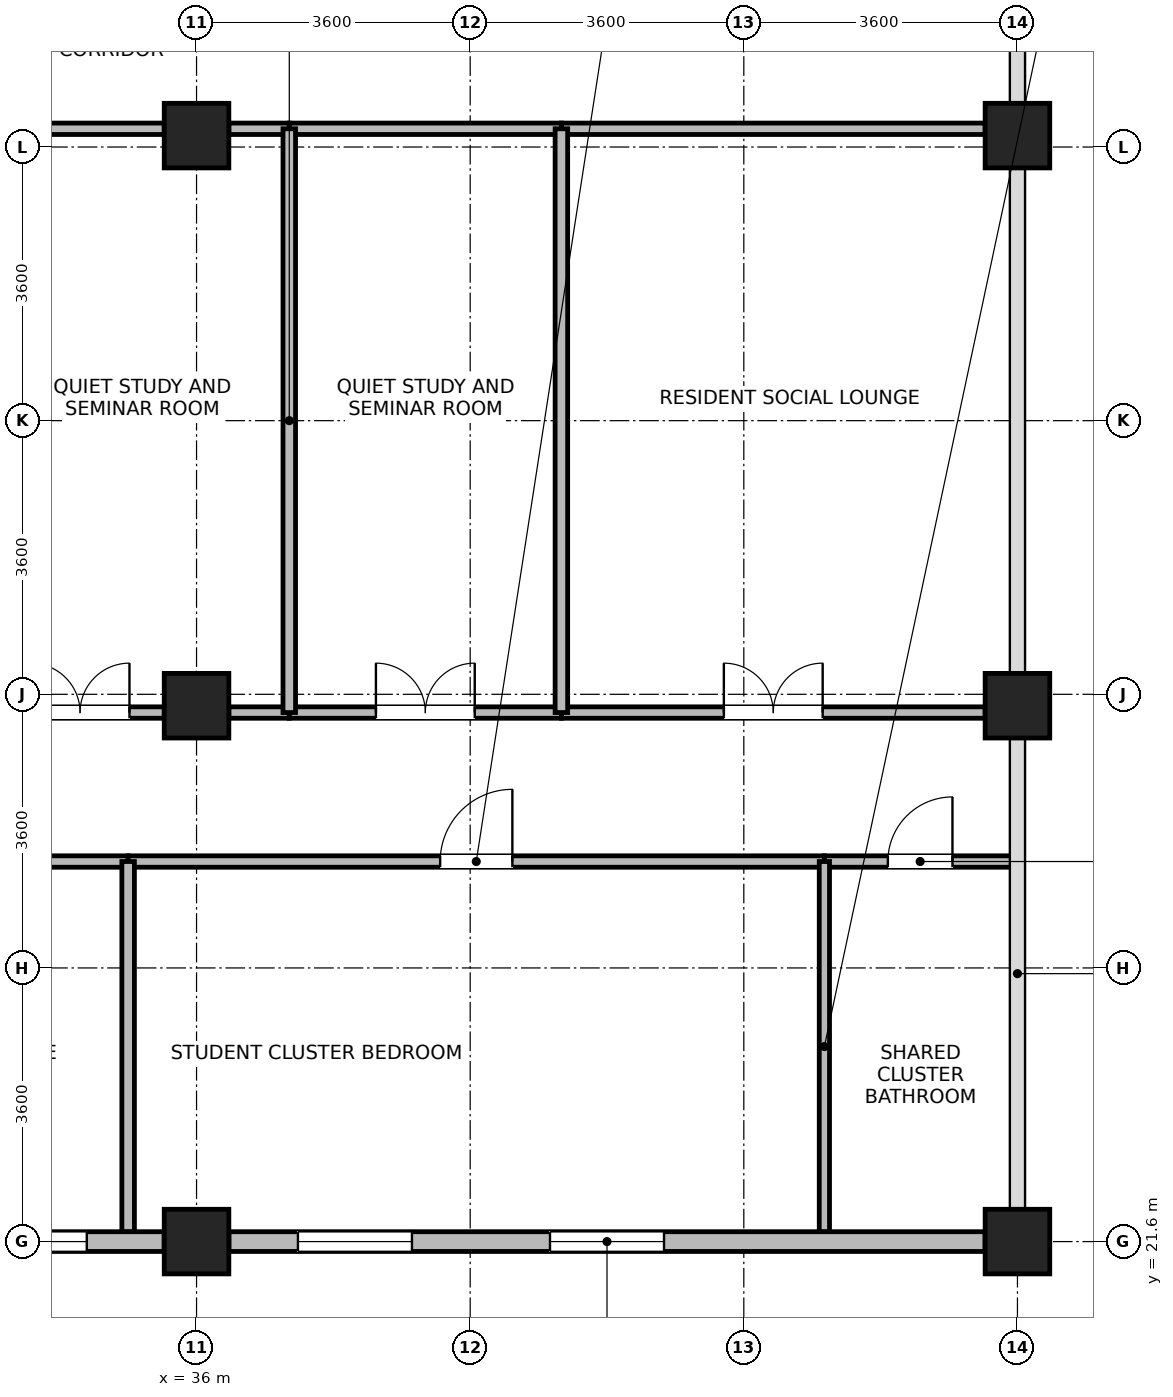
"""IFC4 building model, lengths in metres.
Left out: names, types, materials, properties, quantities, classifications, styles, units other than length and angle.
Written with IfcOpenShell. Run it as: python <this file> out.ifc"""

import sys

from ifc_helpers import new_model, si_unit, direction, frame, frame_2d, origin, origin_2d, place, context, subcontext, project, spatial, rectangle, extrude, source, transform, mapped, element, fill, save


model = new_model("IFC4")
c1 = context("Model", 3, precision=1e-05, world=origin(), true_north=direction((0.0, 1.0)))
c2 = subcontext(c1, "Body", "Model", "MODEL_VIEW")
j1 = project(units=[si_unit("LENGTHUNIT", "METRE"), si_unit("PLANEANGLEUNIT", "RADIAN")], contexts=[c1])
p1 = place(None, origin())
s1 = spatial("IfcSite", under=j1, at=p1, CompositionType="ELEMENT")
p2 = place(p1, origin())
s2 = spatial("IfcBuilding", under=s1, at=p2, CompositionType="ELEMENT")
p3 = place(p2, frame((0.0, 0.0, 283.2)))
s3 = spatial("IfcBuildingStorey", under=s2, at=p3, CompositionType="ELEMENT", Elevation=283.2)
m1 = source(origin(), c2, "Body", "SweptSolid", [
    extrude(rectangle(XDim=0.85, YDim=0.85, at=origin_2d()), origin(), (0.0, 0.0, 1.0), 3.7),
])
for number, where, z_axis, x_axis in (
    (1, (36.0, 21.6, 0.0), (0.0, 0.0, 1.0), (1.0, 0.0, 0.0)),
    (2, (36.0, 28.65, 0.0), (0.0, 0.0, 1.0), (1.0, 0.0, 0.0)),
    (3, (36.0, 36.15, 0.0), (0.0, 0.0, 1.0), (1.0, 0.0, 0.0)),
    (4, (46.8, 21.6, 0.0), (0.0, 0.0, 1.0), (1.0, 0.0, 0.0)),
    (5, (46.8, 28.65, 0.0), (0.0, 0.0, 1.0), (1.0, 0.0, 0.0)),
    (6, (46.8, 36.15, 0.0), (0.0, 0.0, 1.0), (1.0, 0.0, 0.0)),
):
    element("IfcColumn", number, at=place(p3, frame(where, z_axis=z_axis, x_axis=x_axis)), inside=s3, PredefinedType="COLUMN", context=c2, shape_type="MappedRepresentation", body=[
        mapped(m1, transform((0.0, 0.0, 0.0), x_axis=(1.0, 0.0, 0.0), y_axis=(0.0, 1.0, 0.0), z_axis=(0.0, 0.0, 1.0), scale=1.0)),
    ])
p4 = place(p3, frame((35.574, 21.6, 0.0), z_axis=(0.0, 0.0, 1.0), x_axis=(-1.0, 0.0, 0.0)))
e7 = element("IfcWall", 7, at=p4, inside=s3, PredefinedType="STANDARD", context=c2, shape_type="SweptSolid", body=[
    extrude(rectangle(XDim=2.986, YDim=0.26, at=frame_2d((1.493, 0.0))), origin(), (0.0, 0.0, 1.0), 3.055),
])
p5 = place(p4, frame((1.018, 0.0, 0.85)))
e8 = element("IfcOpeningElement", 8, at=p5, cuts=e7, PredefinedType="OPENING", context=c2, shape_type="SweptSolid", body=[
    extrude(rectangle(XDim=0.95, YDim=1.75, at=frame_2d((0.475, 0.875))), frame((0.0, 0.14, 0.0), z_axis=(0.0, -1.0, 0.0), x_axis=(1.0, 0.0, 0.0)), (0.0, 0.0, 1.0), 0.28),
])
p6 = place(p3, frame((46.374, 21.6, 0.0), z_axis=(0.0, 0.0, 1.0), x_axis=(-1.0, 0.0, 0.0)))
e9 = element("IfcWall", 9, at=p6, inside=s3, PredefinedType="STANDARD", context=c2, shape_type="SweptSolid", body=[
    extrude(rectangle(XDim=9.948, YDim=0.26, at=frame_2d((4.974, 0.0))), origin(), (0.0, 0.0, 1.0), 3.055),
])
p7 = place(p6, frame((4.224, 0.0, 0.85)))
e10 = element("IfcOpeningElement", 10, at=p7, cuts=e9, PredefinedType="OPENING", context=c2, shape_type="SweptSolid", body=[
    extrude(rectangle(XDim=1.5, YDim=1.85, at=frame_2d((0.75, 0.925))), frame((0.0, 0.14, 0.0), z_axis=(0.0, -1.0, 0.0), x_axis=(1.0, 0.0, 0.0)), (0.0, 0.0, 1.0), 0.28),
])
p8 = place(p6, frame((7.54, 0.0, 0.85)))
e11 = element("IfcOpeningElement", 11, at=p8, cuts=e9, PredefinedType="OPENING", context=c2, shape_type="SweptSolid", body=[
    extrude(rectangle(XDim=1.5, YDim=1.85, at=frame_2d((0.75, 0.925))), frame((0.0, 0.14, 0.0), z_axis=(0.0, -1.0, 0.0), x_axis=(1.0, 0.0, 0.0)), (0.0, 0.0, 1.0), 0.28),
])
p9 = place(p3, frame((16.2, 26.6, 0.0), z_axis=(0.0, 0.0, 1.0), x_axis=(1.0, 0.0, 0.0)))
e12 = element("IfcWall", 12, at=p9, inside=s3, PredefinedType="PARTITIONING", context=c2, shape_type="SweptSolid", body=[
    extrude(rectangle(XDim=18.9, YDim=0.15, at=frame_2d((9.45, 0.0))), origin(), (0.0, 0.0, 1.0), 3.455),
])
p10 = place(p9, frame((8.8, 0.0, 0.0)))
e13 = element("IfcOpeningElement", 13, at=p10, cuts=e12, PredefinedType="OPENING", context=c2, shape_type="SweptSolid", body=[
    extrude(rectangle(XDim=1.3, YDim=2.12, at=frame_2d((0.65, 1.06))), frame((0.0, 0.085, 0.0), z_axis=(0.0, -1.0, 0.0), x_axis=(1.0, 0.0, 0.0)), (0.0, 0.0, 1.0), 0.17),
])
p11 = place(p3, frame((35.1, 26.6, 0.0), z_axis=(0.0, 0.0, 1.0), x_axis=(1.0, 0.0, 0.0)))
e14 = element("IfcWall", 14, at=p11, inside=s3, PredefinedType="PARTITIONING", context=c2, shape_type="SweptSolid", body=[
    extrude(rectangle(XDim=9.16, YDim=0.15, at=frame_2d((4.58, 0.0))), origin(), (0.0, 0.0, 1.0), 3.455),
])
p12 = place(p11, frame((4.105, 0.0, 0.0)))
e15 = element("IfcOpeningElement", 15, at=p12, cuts=e14, PredefinedType="OPENING", context=c2, shape_type="SweptSolid", body=[
    extrude(rectangle(XDim=0.95, YDim=2.1, at=frame_2d((0.475, 1.05))), frame((0.0, 0.085, 0.0), z_axis=(0.0, -1.0, 0.0), x_axis=(1.0, 0.0, 0.0)), (0.0, 0.0, 1.0), 0.17),
])
p13 = place(p3, frame((40.8, 28.56, 0.0), z_axis=(0.0, 0.0, 1.0), x_axis=(1.0, 0.0, 0.0)))
e16 = element("IfcWall", 16, at=p13, inside=s3, PredefinedType="PARTITIONING", context=c2, shape_type="SweptSolid", body=[
    extrude(rectangle(XDim=5.575, YDim=0.15, at=frame_2d((2.788, 0.0))), origin(), (0.0, 0.0, 1.0), 2.905),
])
p14 = place(p13, frame((2.137, 0.0, 0.0)))
e17 = element("IfcOpeningElement", 17, at=p14, cuts=e16, PredefinedType="OPENING", context=c2, shape_type="SweptSolid", body=[
    extrude(rectangle(XDim=1.3, YDim=2.12, at=frame_2d((0.65, 1.06))), frame((0.0, 0.085, 0.0), z_axis=(0.0, -1.0, 0.0), x_axis=(1.0, 0.0, 0.0)), (0.0, 0.0, 1.0), 0.17),
])
p15 = place(p3, frame((40.8, 36.24, 0.0), z_axis=(0.0, 0.0, 1.0), x_axis=(1.0, 0.0, 0.0)))
e18 = element("IfcWall", 18, at=p15, inside=s3, PredefinedType="PARTITIONING", context=c2, shape_type="SweptSolid", body=[
    extrude(rectangle(XDim=5.575, YDim=0.15, at=frame_2d((2.788, 0.0))), origin(), (0.0, 0.0, 1.0), 2.905),
])
p16 = place(p3, frame((33.36, 28.56, 0.0), z_axis=(0.0, 0.0, 1.0), x_axis=(1.0, 0.0, 0.0)))
e19 = element("IfcWall", 19, at=p16, inside=s3, PredefinedType="PARTITIONING", context=c2, shape_type="SweptSolid", body=[
    extrude(rectangle(XDim=2.215, YDim=0.15, at=frame_2d((1.107, 0.0))), origin(), (0.0, 0.0, 1.0), 2.905),
])
p17 = place(p16, frame((0.458, 0.0, 0.0)))
e20 = element("IfcOpeningElement", 20, at=p17, cuts=e19, PredefinedType="OPENING", context=c2, shape_type="SweptSolid", body=[
    extrude(rectangle(XDim=1.3, YDim=2.12, at=frame_2d((0.65, 1.06))), frame((0.0, 0.085, 0.0), z_axis=(0.0, -1.0, 0.0), x_axis=(1.0, 0.0, 0.0)), (0.0, 0.0, 1.0), 0.17),
])
p18 = place(p3, frame((36.425, 28.56, 0.0), z_axis=(0.0, 0.0, 1.0), x_axis=(1.0, 0.0, 0.0)))
e21 = element("IfcWall", 21, at=p18, inside=s3, PredefinedType="PARTITIONING", context=c2, shape_type="SweptSolid", body=[
    extrude(rectangle(XDim=0.795, YDim=0.15, at=frame_2d((0.397, 0.0))), origin(), (0.0, 0.0, 1.0), 2.905),
])
p19 = place(p3, frame((33.36, 36.24, 0.0), z_axis=(0.0, 0.0, 1.0), x_axis=(1.0, 0.0, 0.0)))
e22 = element("IfcWall", 22, at=p19, inside=s3, PredefinedType="PARTITIONING", context=c2, shape_type="SweptSolid", body=[
    extrude(rectangle(XDim=2.215, YDim=0.15, at=frame_2d((1.107, 0.0))), origin(), (0.0, 0.0, 1.0), 2.905),
])
p20 = place(p3, frame((36.425, 36.24, 0.0), z_axis=(0.0, 0.0, 1.0), x_axis=(1.0, 0.0, 0.0)))
e23 = element("IfcWall", 23, at=p20, inside=s3, PredefinedType="PARTITIONING", context=c2, shape_type="SweptSolid", body=[
    extrude(rectangle(XDim=0.795, YDim=0.15, at=frame_2d((0.397, 0.0))), origin(), (0.0, 0.0, 1.0), 2.905),
])
p21 = place(p3, frame((37.22, 28.56, 0.0), z_axis=(0.0, 0.0, 1.0), x_axis=(1.0, 0.0, 0.0)))
e24 = element("IfcWall", 24, at=p21, inside=s3, PredefinedType="PARTITIONING", context=c2, shape_type="SweptSolid", body=[
    extrude(rectangle(XDim=3.58, YDim=0.15, at=frame_2d((1.79, 0.0))), origin(), (0.0, 0.0, 1.0), 2.905),
])
p22 = place(p21, frame((1.14, 0.0, 0.0)))
e25 = element("IfcOpeningElement", 25, at=p22, cuts=e24, PredefinedType="OPENING", context=c2, shape_type="SweptSolid", body=[
    extrude(rectangle(XDim=1.3, YDim=2.12, at=frame_2d((0.65, 1.06))), frame((0.0, 0.085, 0.0), z_axis=(0.0, -1.0, 0.0), x_axis=(1.0, 0.0, 0.0)), (0.0, 0.0, 1.0), 0.17),
])
p23 = place(p3, frame((37.22, 36.24, 0.0), z_axis=(0.0, 0.0, 1.0), x_axis=(1.0, 0.0, 0.0)))
e26 = element("IfcWall", 26, at=p23, inside=s3, PredefinedType="PARTITIONING", context=c2, shape_type="SweptSolid", body=[
    extrude(rectangle(XDim=3.58, YDim=0.15, at=frame_2d((1.79, 0.0))), origin(), (0.0, 0.0, 1.0), 2.905),
])
p24 = place(p3, frame((44.26, 26.6, 0.0), z_axis=(0.0, 0.0, 1.0), x_axis=(1.0, 0.0, 0.0)))
e27 = element("IfcWall", 27, at=p24, inside=s3, PredefinedType="PARTITIONING", context=c2, shape_type="SweptSolid", body=[
    extrude(rectangle(XDim=2.52, YDim=0.15, at=frame_2d((1.26, 0.0))), origin(), (0.0, 0.0, 1.0), 3.455),
])
p25 = place(p24, frame((0.835, 0.0, 0.0)))
e28 = element("IfcOpeningElement", 28, at=p25, cuts=e27, PredefinedType="OPENING", context=c2, shape_type="SweptSolid", body=[
    extrude(rectangle(XDim=0.85, YDim=2.04, at=frame_2d((0.425, 1.02))), frame((0.0, 0.085, 0.0), z_axis=(0.0, -1.0, 0.0), x_axis=(1.0, 0.0, 0.0)), (0.0, 0.0, 1.0), 0.17),
])
for number, where, z_axis, x_axis in (
    (29, (37.22, 28.56, 0.0), (0.0, 0.0, 1.0), (0.0, 1.0, 0.0)),
    (30, (40.8, 28.56, 0.0), (0.0, 0.0, 1.0), (0.0, 1.0, 0.0)),
):
    element("IfcWall", number, at=place(p3, frame(where, z_axis=z_axis, x_axis=x_axis)), inside=s3, PredefinedType="PARTITIONING", context=c2, shape_type="SweptSolid", body=[
        extrude(rectangle(XDim=7.68, YDim=0.165, at=frame_2d((3.84, 0.0))), origin(), (0.0, 0.0, 1.0), 3.455),
    ])
p26 = place(p3, frame((35.1, 21.732, 0.0), z_axis=(0.0, 0.0, 1.0), x_axis=(0.0, 1.0, 0.0)))
e31 = element("IfcWall", 31, at=p26, inside=s3, PredefinedType="PARTITIONING", context=c2, shape_type="SweptSolid", body=[
    extrude(rectangle(XDim=4.868, YDim=0.165, at=frame_2d((2.434, 0.0))), origin(), (0.0, 0.0, 1.0), 3.455),
])
p27 = place(p3, frame((44.26, 21.732, 0.0), z_axis=(0.0, 0.0, 1.0), x_axis=(0.0, 1.0, 0.0)))
e32 = element("IfcWall", 32, at=p27, inside=s3, PredefinedType="PARTITIONING", context=c2, shape_type="SweptSolid", body=[
    extrude(rectangle(XDim=4.868, YDim=0.135, at=frame_2d((2.434, 0.0))), origin(), (0.0, 0.0, 1.0), 3.455),
])
p28 = place(p5, origin())
e33 = element("IfcWindow", 33, at=p28, inside=s3, PartitioningType="SINGLE_PANEL", PredefinedType="WINDOW", context=c2, shape_type="SweptSolid", body=[
    extrude(rectangle(XDim=0.95, YDim=1.75, at=frame_2d((0.475, 0.875))), frame((0.0, 0.03, 0.0), z_axis=(0.0, -1.0, 0.0), x_axis=(1.0, 0.0, 0.0)), (0.0, 0.0, 1.0), 0.06),
])
fill(e8, e33)
p29 = place(p7, origin())
e34 = element("IfcWindow", 34, at=p29, inside=s3, PartitioningType="SINGLE_PANEL", PredefinedType="WINDOW", context=c2, shape_type="SweptSolid", body=[
    extrude(rectangle(XDim=1.5, YDim=1.85, at=frame_2d((0.75, 0.925))), frame((0.0, 0.03, 0.0), z_axis=(0.0, -1.0, 0.0), x_axis=(1.0, 0.0, 0.0)), (0.0, 0.0, 1.0), 0.06),
])
fill(e10, e34)
p30 = place(p8, origin())
e35 = element("IfcWindow", 35, at=p30, inside=s3, PartitioningType="SINGLE_PANEL", PredefinedType="WINDOW", context=c2, shape_type="SweptSolid", body=[
    extrude(rectangle(XDim=1.5, YDim=1.85, at=frame_2d((0.75, 0.925))), frame((0.0, 0.03, 0.0), z_axis=(0.0, -1.0, 0.0), x_axis=(1.0, 0.0, 0.0)), (0.0, 0.0, 1.0), 0.06),
])
fill(e11, e35)
p31 = place(p12, origin())
e36 = element("IfcDoor", 36, at=p31, inside=s3, OperationType="SINGLE_SWING_RIGHT", PredefinedType="DOOR", context=c2, shape_type="SweptSolid", body=[
    extrude(rectangle(XDim=0.95, YDim=2.1, at=frame_2d((0.475, 1.05))), frame((0.0, 0.025, 0.0), z_axis=(0.0, -1.0, 0.0), x_axis=(1.0, 0.0, 0.0)), (0.0, 0.0, 1.0), 0.05),
])
fill(e15, e36)
p32 = place(p14, origin())
e37 = element("IfcDoor", 37, at=p32, inside=s3, OperationType="DOUBLE_DOOR_SINGLE_SWING", PredefinedType="DOOR", context=c2, shape_type="SweptSolid", body=[
    extrude(rectangle(XDim=1.3, YDim=2.12, at=frame_2d((0.65, 1.06))), frame((0.0, 0.025, 0.0), z_axis=(0.0, -1.0, 0.0), x_axis=(1.0, 0.0, 0.0)), (0.0, 0.0, 1.0), 0.05),
])
fill(e17, e37)
p33 = place(p17, origin())
e38 = element("IfcDoor", 38, at=p33, inside=s3, OperationType="DOUBLE_DOOR_SINGLE_SWING", PredefinedType="DOOR", context=c2, shape_type="SweptSolid", body=[
    extrude(rectangle(XDim=1.3, YDim=2.12, at=frame_2d((0.65, 1.06))), frame((0.0, 0.025, 0.0), z_axis=(0.0, -1.0, 0.0), x_axis=(1.0, 0.0, 0.0)), (0.0, 0.0, 1.0), 0.05),
])
fill(e20, e38)
p34 = place(p22, origin())
e39 = element("IfcDoor", 39, at=p34, inside=s3, OperationType="DOUBLE_DOOR_SINGLE_SWING", PredefinedType="DOOR", context=c2, shape_type="SweptSolid", body=[
    extrude(rectangle(XDim=1.3, YDim=2.12, at=frame_2d((0.65, 1.06))), frame((0.0, 0.025, 0.0), z_axis=(0.0, -1.0, 0.0), x_axis=(1.0, 0.0, 0.0)), (0.0, 0.0, 1.0), 0.05),
])
fill(e25, e39)
p35 = place(p25, origin())
e40 = element("IfcDoor", 40, at=p35, inside=s3, OperationType="SINGLE_SWING_RIGHT", PredefinedType="DOOR", context=c2, shape_type="SweptSolid", body=[
    extrude(rectangle(XDim=0.85, YDim=2.04, at=frame_2d((0.425, 1.02))), frame((0.0, 0.025, 0.0), z_axis=(0.0, -1.0, 0.0), x_axis=(1.0, 0.0, 0.0)), (0.0, 0.0, 1.0), 0.05),
])
fill(e28, e40)
save(model, sys.argv[1])
